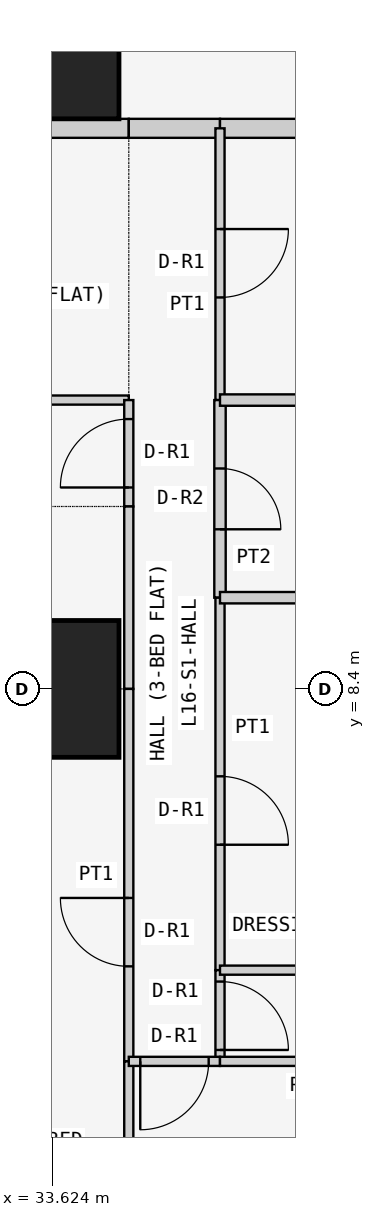
"""IFC4 building model, lengths in metres.
Left out: names, types, materials, properties, quantities, classifications, styles, units other than length and angle.
Written with IfcOpenShell. Run it as: python <this file> out.ifc"""

import sys

from ifc_helpers import new_model, si_unit, direction, frame, frame_2d, origin, origin_2d, place, context, subcontext, project, spatial, rectangle, extrude, element, fill, save


model = new_model("IFC4")
c1 = context("Model", 3, precision=1e-05, world=origin(), true_north=direction((0.0, 1.0)))
c2 = subcontext(c1, "Body", "Model", "MODEL_VIEW")
j1 = project(units=[si_unit("LENGTHUNIT", "METRE"), si_unit("PLANEANGLEUNIT", "RADIAN")], contexts=[c1])
p1 = place(None, origin())
s1 = spatial("IfcSite", under=j1, at=p1, CompositionType="ELEMENT")
p2 = place(p1, origin())
s2 = spatial("IfcBuilding", under=s1, at=p2, CompositionType="ELEMENT")
p3 = place(p2, frame((0.0, 0.0, 66.9)))
s3 = spatial("IfcBuildingStorey", under=s2, at=p3, CompositionType="ELEMENT", Elevation=66.9)
for number, where, z_axis, x_axis in (
    (1, (33.6, 8.4, 0.0), (0.0, 0.0, 1.0), (1.0, 0.0, 0.0)),
    (2, (33.6, 16.8, 0.0), (0.0, 0.0, 1.0), (1.0, 0.0, 0.0)),
):
    element("IfcColumn", number, at=place(p3, frame(where, z_axis=z_axis, x_axis=x_axis)), inside=s3, PredefinedType="COLUMN", context=c2, shape_type="SweptSolid", body=[
        extrude(rectangle(XDim=1.8, YDim=1.8, at=origin_2d()), origin(), (0.0, 0.0, 1.0), 3.6),
    ])
p4 = place(p3, frame((34.629, 15.775, 0.0), z_axis=(0.0, 0.0, 1.0), x_axis=(-1.0, 0.0, 0.0)))
e3 = element("IfcWall", 3, at=p4, inside=s3, PredefinedType="PARTITIONING", context=c2, shape_type="SweptSolid", body=[
    extrude(rectangle(XDim=5.229, YDim=0.25, at=frame_2d((2.615, 0.0))), origin(), (0.0, 0.0, 1.0), 3.45),
])
p5 = place(p4, frame((2.129, 0.0, 0.0)))
e4 = element("IfcOpeningElement", 4, at=p5, cuts=e3, PredefinedType="OPENING", context=c2, shape_type="SweptSolid", body=[
    extrude(rectangle(XDim=1.0, YDim=2.1, at=frame_2d((0.5, 1.05))), frame((0.0, 0.135, 0.0), z_axis=(0.0, -1.0, 0.0), x_axis=(1.0, 0.0, 0.0)), (0.0, 0.0, 1.0), 0.27),
])
p6 = place(p3, frame((35.829, 15.775, 0.0), z_axis=(0.0, 0.0, 1.0), x_axis=(-1.0, 0.0, 0.0)))
e5 = element("IfcWall", 5, at=p6, inside=s3, PredefinedType="PARTITIONING", context=c2, shape_type="SweptSolid", body=[
    extrude(rectangle(XDim=1.2, YDim=0.25, at=frame_2d((0.6, 0.0))), origin(), (0.0, 0.0, 1.0), 3.45),
])
p7 = place(p3, frame((42.7, 15.775, 0.0), z_axis=(0.0, 0.0, 1.0), x_axis=(-1.0, 0.0, 0.0)))
e6 = element("IfcWall", 6, at=p7, inside=s3, PredefinedType="PARTITIONING", context=c2, shape_type="SweptSolid", body=[
    extrude(rectangle(XDim=6.871, YDim=0.25, at=frame_2d((3.436, 0.0))), origin(), (0.0, 0.0, 1.0), 3.45),
])
p8 = place(p3, frame((29.4, 12.2, 0.0), z_axis=(0.0, 0.0, 1.0), x_axis=(1.0, 0.0, 0.0)))
e7 = element("IfcWall", 7, at=p8, inside=s3, PredefinedType="PARTITIONING", context=c2, shape_type="SweptSolid", body=[
    extrude(rectangle(XDim=5.229, YDim=0.12, at=frame_2d((2.615, 0.0))), origin(), (0.0, 0.0, 1.0), 3.45),
])
p9 = place(p3, frame((34.629, 10.8, 0.0), z_axis=(0.0, 0.0, 1.0), x_axis=(0.0, 1.0, 0.0)))
e8 = element("IfcWall", 8, at=p9, inside=s3, PredefinedType="PARTITIONING", context=c2, shape_type="SweptSolid", body=[
    extrude(rectangle(XDim=1.4, YDim=0.12, at=frame_2d((0.7, 0.0))), origin(), (0.0, 0.0, 1.0), 3.45),
])
p10 = place(p9, frame((0.25, 0.0, 0.0)))
e9 = element("IfcOpeningElement", 9, at=p10, cuts=e8, PredefinedType="OPENING", context=c2, shape_type="SweptSolid", body=[
    extrude(rectangle(XDim=0.9, YDim=2.1, at=frame_2d((0.45, 1.05))), frame((0.0, 0.07, 0.0), z_axis=(0.0, -1.0, 0.0), x_axis=(1.0, 0.0, 0.0)), (0.0, 0.0, 1.0), 0.14),
])
p11 = place(p3, frame((34.629, 8.4, 0.0), z_axis=(0.0, 0.0, 1.0), x_axis=(0.0, 1.0, 0.0)))
e10 = element("IfcWall", 10, at=p11, inside=s3, PredefinedType="PARTITIONING", context=c2, shape_type="SweptSolid", body=[
    extrude(rectangle(XDim=2.4, YDim=0.12, at=frame_2d((1.2, 0.0))), origin(), (0.0, 0.0, 1.0), 3.45),
])
p12 = place(p3, frame((34.629, 3.5, 0.0), z_axis=(0.0, 0.0, 1.0), x_axis=(0.0, 1.0, 0.0)))
e11 = element("IfcWall", 11, at=p12, inside=s3, PredefinedType="PARTITIONING", context=c2, shape_type="SweptSolid", body=[
    extrude(rectangle(XDim=4.9, YDim=0.12, at=frame_2d((2.45, 0.0))), origin(), (0.0, 0.0, 1.0), 3.45),
])
p13 = place(p12, frame((1.25, 0.0, 0.0)))
e12 = element("IfcOpeningElement", 12, at=p13, cuts=e11, PredefinedType="OPENING", context=c2, shape_type="SweptSolid", body=[
    extrude(rectangle(XDim=0.9, YDim=2.1, at=frame_2d((0.45, 1.05))), frame((0.0, 0.07, 0.0), z_axis=(0.0, -1.0, 0.0), x_axis=(1.0, 0.0, 0.0)), (0.0, 0.0, 1.0), 0.14),
])
p14 = place(p3, frame((34.629, -0.65, 0.0), z_axis=(0.0, 0.0, 1.0), x_axis=(0.0, 1.0, 0.0)))
e13 = element("IfcWall", 13, at=p14, inside=s3, PredefinedType="PARTITIONING", context=c2, shape_type="SweptSolid", body=[
    extrude(rectangle(XDim=4.15, YDim=0.12, at=frame_2d((2.075, 0.0))), origin(), (0.0, 0.0, 1.0), 3.45),
])
p15 = place(p3, frame((35.829, 12.2, 0.0), z_axis=(0.0, 0.0, 1.0), x_axis=(0.0, 1.0, 0.0)))
e14 = element("IfcWall", 14, at=p15, inside=s3, PredefinedType="PARTITIONING", context=c2, shape_type="SweptSolid", body=[
    extrude(rectangle(XDim=3.575, YDim=0.12, at=frame_2d((1.788, 0.0))), origin(), (0.0, 0.0, 1.0), 3.45),
])
p16 = place(p15, frame((1.35, 0.0, 0.0)))
e15 = element("IfcOpeningElement", 15, at=p16, cuts=e14, PredefinedType="OPENING", context=c2, shape_type="SweptSolid", body=[
    extrude(rectangle(XDim=0.9, YDim=2.1, at=frame_2d((0.45, 1.05))), frame((0.0, 0.07, 0.0), z_axis=(0.0, -1.0, 0.0), x_axis=(1.0, 0.0, 0.0)), (0.0, 0.0, 1.0), 0.14),
])
p17 = place(p3, frame((35.829, 9.6, 0.0), z_axis=(0.0, 0.0, 1.0), x_axis=(0.0, 1.0, 0.0)))
e16 = element("IfcWall", 16, at=p17, inside=s3, PredefinedType="PARTITIONING", context=c2, shape_type="SweptSolid", body=[
    extrude(rectangle(XDim=2.6, YDim=0.15, at=frame_2d((1.3, 0.0))), origin(), (0.0, 0.0, 1.0), 3.45),
])
p18 = place(p17, frame((0.9, 0.0, 0.0)))
e17 = element("IfcOpeningElement", 17, at=p18, cuts=e16, PredefinedType="OPENING", context=c2, shape_type="SweptSolid", body=[
    extrude(rectangle(XDim=0.8, YDim=2.1, at=frame_2d((0.4, 1.05))), frame((0.0, 0.085, 0.0), z_axis=(0.0, -1.0, 0.0), x_axis=(1.0, 0.0, 0.0)), (0.0, 0.0, 1.0), 0.17),
])
p19 = place(p3, frame((35.829, 4.7, 0.0), z_axis=(0.0, 0.0, 1.0), x_axis=(0.0, 1.0, 0.0)))
e18 = element("IfcWall", 18, at=p19, inside=s3, PredefinedType="PARTITIONING", context=c2, shape_type="SweptSolid", body=[
    extrude(rectangle(XDim=4.9, YDim=0.12, at=frame_2d((2.45, 0.0))), origin(), (0.0, 0.0, 1.0), 3.45),
])
p20 = place(p19, frame((1.65, 0.0, 0.0)))
e19 = element("IfcOpeningElement", 19, at=p20, cuts=e18, PredefinedType="OPENING", context=c2, shape_type="SweptSolid", body=[
    extrude(rectangle(XDim=0.9, YDim=2.1, at=frame_2d((0.45, 1.05))), frame((0.0, 0.07, 0.0), z_axis=(0.0, -1.0, 0.0), x_axis=(1.0, 0.0, 0.0)), (0.0, 0.0, 1.0), 0.14),
])
p21 = place(p3, frame((35.829, 3.5, 0.0), z_axis=(0.0, 0.0, 1.0), x_axis=(0.0, 1.0, 0.0)))
e20 = element("IfcWall", 20, at=p21, inside=s3, PredefinedType="PARTITIONING", context=c2, shape_type="SweptSolid", body=[
    extrude(rectangle(XDim=1.2, YDim=0.12, at=frame_2d((0.6, 0.0))), origin(), (0.0, 0.0, 1.0), 3.45),
])
p22 = place(p21, frame((0.15, 0.0, 0.0)))
e21 = element("IfcOpeningElement", 21, at=p22, cuts=e20, PredefinedType="OPENING", context=c2, shape_type="SweptSolid", body=[
    extrude(rectangle(XDim=0.9, YDim=2.1, at=frame_2d((0.45, 1.05))), frame((0.0, 0.07, 0.0), z_axis=(0.0, -1.0, 0.0), x_axis=(1.0, 0.0, 0.0)), (0.0, 0.0, 1.0), 0.14),
])
p23 = place(p3, frame((34.629, 3.5, 0.0), z_axis=(0.0, 0.0, 1.0), x_axis=(1.0, 0.0, 0.0)))
e22 = element("IfcWall", 22, at=p23, inside=s3, PredefinedType="PARTITIONING", context=c2, shape_type="SweptSolid", body=[
    extrude(rectangle(XDim=1.2, YDim=0.12, at=frame_2d((0.6, 0.0))), origin(), (0.0, 0.0, 1.0), 3.45),
])
p24 = place(p23, frame((0.151, 0.0, 0.0)))
e23 = element("IfcOpeningElement", 23, at=p24, cuts=e22, PredefinedType="OPENING", context=c2, shape_type="SweptSolid", body=[
    extrude(rectangle(XDim=0.9, YDim=2.1, at=frame_2d((0.45, 1.05))), frame((0.0, 0.07, 0.0), z_axis=(0.0, -1.0, 0.0), x_axis=(1.0, 0.0, 0.0)), (0.0, 0.0, 1.0), 0.14),
])
for number, where, z_axis, x_axis in (
    (24, (35.829, 12.2, 0.0), (0.0, 0.0, 1.0), (1.0, 0.0, 0.0)),
    (25, (35.829, 9.6, 0.0), (0.0, 0.0, 1.0), (1.0, 0.0, 0.0)),
):
    element("IfcWall", number, at=place(p3, frame(where, z_axis=z_axis, x_axis=x_axis)), inside=s3, PredefinedType="PARTITIONING", context=c2, shape_type="SweptSolid", body=[
        extrude(rectangle(XDim=2.971, YDim=0.15, at=frame_2d((1.485, 0.0))), origin(), (0.0, 0.0, 1.0), 3.45),
    ])
for number, where, z_axis, x_axis in (
    (26, (35.829, 4.7, 0.0), (0.0, 0.0, 1.0), (1.0, 0.0, 0.0)),
    (27, (35.829, 3.5, 0.0), (0.0, 0.0, 1.0), (1.0, 0.0, 0.0)),
):
    element("IfcWall", number, at=place(p3, frame(where, z_axis=z_axis, x_axis=x_axis)), inside=s3, PredefinedType="PARTITIONING", context=c2, shape_type="SweptSolid", body=[
        extrude(rectangle(XDim=2.285, YDim=0.12, at=frame_2d((1.143, 0.0))), origin(), (0.0, 0.0, 1.0), 3.45),
    ])
p25 = place(p10, origin())
e28 = element("IfcDoor", 28, at=p25, inside=s3, OperationType="SINGLE_SWING_LEFT", PredefinedType="DOOR", context=c2, shape_type="SweptSolid", body=[
    extrude(rectangle(XDim=0.9, YDim=2.1, at=frame_2d((0.45, 1.05))), frame((0.0, 0.025, 0.0), z_axis=(0.0, -1.0, 0.0), x_axis=(1.0, 0.0, 0.0)), (0.0, 0.0, 1.0), 0.05),
])
fill(e9, e28)
p26 = place(p13, origin())
e29 = element("IfcDoor", 29, at=p26, inside=s3, OperationType="SINGLE_SWING_RIGHT", PredefinedType="DOOR", context=c2, shape_type="SweptSolid", body=[
    extrude(rectangle(XDim=0.9, YDim=2.1, at=frame_2d((0.45, 1.05))), frame((0.0, 0.025, 0.0), z_axis=(0.0, -1.0, 0.0), x_axis=(1.0, 0.0, 0.0)), (0.0, 0.0, 1.0), 0.05),
])
fill(e12, e29)
p27 = place(p16, frame((0.9, 0.0, 0.0), z_axis=(0.0, 0.0, 1.0), x_axis=(-1.0, 0.0, 0.0)))
e30 = element("IfcDoor", 30, at=p27, inside=s3, OperationType="SINGLE_SWING_LEFT", PredefinedType="DOOR", context=c2, shape_type="SweptSolid", body=[
    extrude(rectangle(XDim=0.9, YDim=2.1, at=frame_2d((0.45, 1.05))), frame((0.0, 0.025, 0.0), z_axis=(0.0, -1.0, 0.0), x_axis=(1.0, 0.0, 0.0)), (0.0, 0.0, 1.0), 0.05),
])
fill(e15, e30)
p28 = place(p18, frame((0.8, 0.0, 0.0), z_axis=(0.0, 0.0, 1.0), x_axis=(-1.0, 0.0, 0.0)))
e31 = element("IfcDoor", 31, at=p28, inside=s3, OperationType="SINGLE_SWING_RIGHT", PredefinedType="DOOR", context=c2, shape_type="SweptSolid", body=[
    extrude(rectangle(XDim=0.8, YDim=2.1, at=frame_2d((0.4, 1.05))), frame((0.0, 0.025, 0.0), z_axis=(0.0, -1.0, 0.0), x_axis=(1.0, 0.0, 0.0)), (0.0, 0.0, 1.0), 0.05),
])
fill(e17, e31)
p29 = place(p20, frame((0.9, 0.0, 0.0), z_axis=(0.0, 0.0, 1.0), x_axis=(-1.0, 0.0, 0.0)))
e32 = element("IfcDoor", 32, at=p29, inside=s3, OperationType="SINGLE_SWING_RIGHT", PredefinedType="DOOR", context=c2, shape_type="SweptSolid", body=[
    extrude(rectangle(XDim=0.9, YDim=2.1, at=frame_2d((0.45, 1.05))), frame((0.0, 0.025, 0.0), z_axis=(0.0, -1.0, 0.0), x_axis=(1.0, 0.0, 0.0)), (0.0, 0.0, 1.0), 0.05),
])
fill(e19, e32)
p30 = place(p22, frame((0.9, 0.0, 0.0), z_axis=(0.0, 0.0, 1.0), x_axis=(-1.0, 0.0, 0.0)))
e33 = element("IfcDoor", 33, at=p30, inside=s3, OperationType="SINGLE_SWING_RIGHT", PredefinedType="DOOR", context=c2, shape_type="SweptSolid", body=[
    extrude(rectangle(XDim=0.9, YDim=2.1, at=frame_2d((0.45, 1.05))), frame((0.0, 0.025, 0.0), z_axis=(0.0, -1.0, 0.0), x_axis=(1.0, 0.0, 0.0)), (0.0, 0.0, 1.0), 0.05),
])
fill(e21, e33)
p31 = place(p24, frame((0.9, 0.0, 0.0), z_axis=(0.0, 0.0, 1.0), x_axis=(-1.0, 0.0, 0.0)))
e34 = element("IfcDoor", 34, at=p31, inside=s3, OperationType="SINGLE_SWING_RIGHT", PredefinedType="DOOR", context=c2, shape_type="SweptSolid", body=[
    extrude(rectangle(XDim=0.9, YDim=2.1, at=frame_2d((0.45, 1.05))), frame((0.0, 0.025, 0.0), z_axis=(0.0, -1.0, 0.0), x_axis=(1.0, 0.0, 0.0)), (0.0, 0.0, 1.0), 0.05),
])
fill(e23, e34)
save(model, sys.argv[1])
